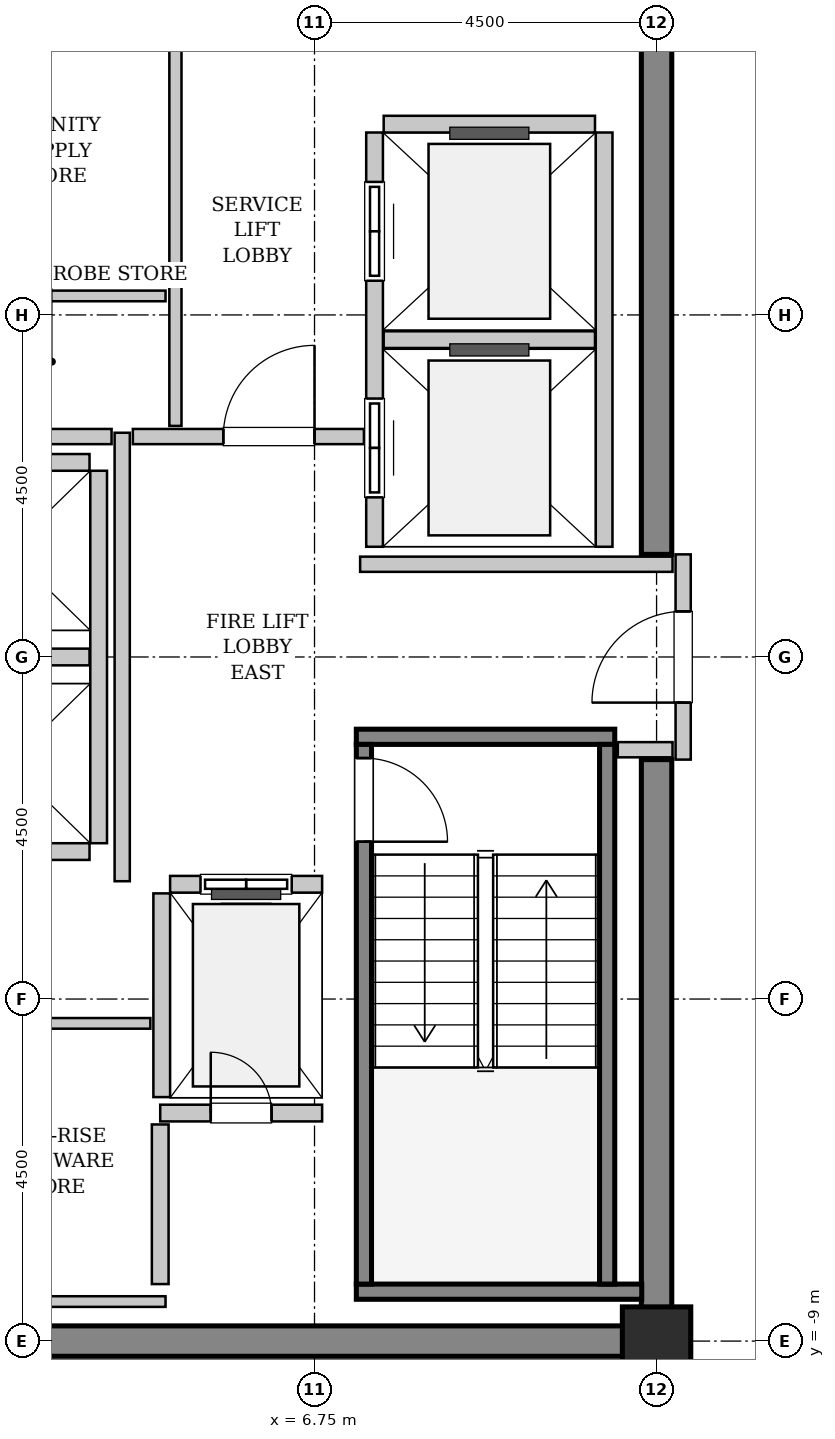
"""IFC4 building model, lengths in metres.
Left out: names, types, materials, properties, quantities, classifications, styles, units other than length and angle.
Written with IfcOpenShell. Run it as: python <this file> out.ifc"""

import sys

from ifc_helpers import new_model, si_unit, direction, frame, frame_2d, origin, origin_2d, place, context, subcontext, project, spatial, rectangle, extrude, source, transform, mapped, element, fill, save


model = new_model("IFC4")
c1 = context("Model", 3, precision=1e-05, world=origin(), true_north=direction((0.0, 1.0)))
c2 = subcontext(c1, "Body", "Model", "MODEL_VIEW")
j1 = project(units=[si_unit("LENGTHUNIT", "METRE"), si_unit("PLANEANGLEUNIT", "RADIAN")], contexts=[c1])
p1 = place(None, origin())
s1 = spatial("IfcSite", under=j1, at=p1, CompositionType="ELEMENT")
p2 = place(p1, origin())
s2 = spatial("IfcBuilding", under=s1, at=p2, CompositionType="ELEMENT")
p3 = place(p2, frame((0.0, 0.0, 345.2)))
s3 = spatial("IfcBuildingStorey", under=s2, at=p3, CompositionType="ELEMENT", Elevation=345.2)
m1 = source(origin(), c2, "Body", "SweptSolid", [
    extrude(rectangle(XDim=9.9, YDim=0.4, at=frame_2d((4.95, 0.0))), origin(), (0.0, 0.0, 1.0), 3.8),
])
p4 = place(p3, frame((1.55, -9.0, 0.0), z_axis=(0.0, 0.0, 1.0), x_axis=(1.0, 0.0, 0.0)))
e1 = element("IfcWall", 1, at=p4, inside=s3, PredefinedType="SHEAR", context=c2, shape_type="MappedRepresentation", body=[
    mapped(m1, transform((0.0, 0.0, 0.0), x_axis=(1.0, 0.0, 0.0), y_axis=(0.0, 1.0, 0.0), z_axis=(0.0, 0.0, 1.0), scale=1.0)),
])
m2 = source(origin(), c2, "Body", "SweptSolid", [
    extrude(rectangle(XDim=7.45, YDim=0.4, at=frame_2d((3.725, 0.0))), origin(), (0.0, 0.0, 1.0), 3.8),
])
for number, where, z_axis, x_axis in (
    (2, (11.25, -8.8, 0.0), (0.0, 0.0, 1.0), (0.0, 1.0, 0.0)),
    (3, (11.25, 1.35, 0.0), (0.0, 0.0, 1.0), (0.0, 1.0, 0.0)),
):
    element("IfcWall", number, at=place(p3, frame(where, z_axis=z_axis, x_axis=x_axis)), inside=s3, PredefinedType="SHEAR", context=c2, shape_type="MappedRepresentation", body=[
        mapped(m2, transform((0.0, 0.0, 0.0), x_axis=(1.0, 0.0, 0.0), y_axis=(0.0, 1.0, 0.0), z_axis=(0.0, 0.0, 1.0), scale=1.0)),
    ])
m3 = source(origin(), c2, "Body", "SweptSolid", [
    extrude(rectangle(XDim=0.9, YDim=0.9, at=origin_2d()), origin(), (0.0, 0.0, 1.0), 3.8),
])
p5 = place(p3, frame((11.25, -9.0, 0.0), z_axis=(0.0, 0.0, 1.0), x_axis=(1.0, 0.0, 0.0)))
e4 = element("IfcColumn", 4, at=p5, inside=s3, PredefinedType="COLUMN", context=c2, shape_type="MappedRepresentation", body=[
    mapped(m3, transform((0.0, 0.0, 0.0), x_axis=(1.0, 0.0, 0.0), y_axis=(0.0, 1.0, 0.0), z_axis=(0.0, 0.0, 1.0), scale=1.0)),
])
m4 = source(origin(), c2, "Body", "SweptSolid", [
    extrude(rectangle(XDim=3.4, YDim=0.2, at=frame_2d((1.7, 0.0))), origin(), (0.0, 0.0, 1.0), 3.8),
])
p6 = place(p3, frame((7.3, -1.05, 0.0), z_axis=(0.0, 0.0, 1.0), x_axis=(1.0, 0.0, 0.0)))
e5 = element("IfcWall", 5, at=p6, inside=s3, PredefinedType="SOLIDWALL", context=c2, shape_type="MappedRepresentation", body=[
    mapped(m4, transform((0.0, 0.0, 0.0), x_axis=(1.0, 0.0, 0.0), y_axis=(0.0, 1.0, 0.0), z_axis=(0.0, 0.0, 1.0), scale=1.0)),
])
m5 = source(origin(), c2, "Body", "SweptSolid", [
    extrude(rectangle(XDim=3.755, YDim=0.2, at=frame_2d((1.877, 0.0))), origin(), (0.0, 0.0, 1.0), 3.8),
])
p7 = place(p3, frame((7.3, -8.35, 0.0), z_axis=(0.0, 0.0, 1.0), x_axis=(1.0, 0.0, 0.0)))
e6 = element("IfcWall", 6, at=p7, inside=s3, PredefinedType="SOLIDWALL", context=c2, shape_type="MappedRepresentation", body=[
    mapped(m5, transform((0.0, 0.0, 0.0), x_axis=(1.0, 0.0, 0.0), y_axis=(0.0, 1.0, 0.0), z_axis=(0.0, 0.0, 1.0), scale=1.0)),
])
m6 = source(origin(), c2, "Body", "SweptSolid", [
    extrude(rectangle(XDim=7.1, YDim=0.2, at=frame_2d((3.55, 0.0))), origin(), (0.0, 0.0, 1.0), 3.8),
])
p8 = place(p3, frame((7.4, -1.15, 0.0), z_axis=(0.0, 0.0, 1.0), x_axis=(0.0, -1.0, 0.0)))
e7 = element("IfcWall", 7, at=p8, inside=s3, PredefinedType="SOLIDWALL", context=c2, shape_type="MappedRepresentation", body=[
    mapped(m6, transform((0.0, 0.0, 0.0), x_axis=(1.0, 0.0, 0.0), y_axis=(0.0, 1.0, 0.0), z_axis=(0.0, 0.0, 1.0), scale=1.0)),
])
p9 = place(p8, frame((0.18, 0.0, 0.0)))
e8 = element("IfcOpeningElement", 8, at=p9, cuts=e7, PredefinedType="OPENING", context=c2, shape_type="SweptSolid", body=[
    extrude(rectangle(XDim=1.1, YDim=2.15, at=frame_2d((0.55, 1.075))), frame((0.0, 0.11, 0.0), z_axis=(0.0, -1.0, 0.0), x_axis=(1.0, 0.0, 0.0)), (0.0, 0.0, 1.0), 0.22),
])
p10 = place(p3, frame((10.6, -1.15, 0.0), z_axis=(0.0, 0.0, 1.0), x_axis=(0.0, -1.0, 0.0)))
e9 = element("IfcWall", 9, at=p10, inside=s3, PredefinedType="SOLIDWALL", context=c2, shape_type="MappedRepresentation", body=[
    mapped(m6, transform((0.0, 0.0, 0.0), x_axis=(1.0, 0.0, 0.0), y_axis=(0.0, 1.0, 0.0), z_axis=(0.0, 0.0, 1.0), scale=1.0)),
])
m7 = source(origin(), c2, "Body", "SweptSolid", [
    extrude(rectangle(XDim=2.0, YDim=0.22, at=frame_2d((1.0, 0.0))), origin(), (0.0, 0.0, 1.0), 3.485),
])
p11 = place(p3, frame((6.85, -2.99, 0.0), z_axis=(0.0, 0.0, 1.0), x_axis=(-1.0, 0.0, 0.0)))
e10 = element("IfcWall", 10, at=p11, inside=s3, PredefinedType="SOLIDWALL", context=c2, shape_type="MappedRepresentation", body=[
    mapped(m7, transform((0.0, 0.0, 0.0), x_axis=(1.0, 0.0, 0.0), y_axis=(0.0, 1.0, 0.0), z_axis=(0.0, 0.0, 1.0), scale=1.0)),
])
p12 = place(p11, frame((0.4, 0.0, 0.0)))
e11 = element("IfcOpeningElement", 11, at=p12, cuts=e10, PredefinedType="OPENING", context=c2, shape_type="SweptSolid", body=[
    extrude(rectangle(XDim=1.2, YDim=2.2, at=frame_2d((0.6, 1.1))), frame((0.0, 0.12, 0.0), z_axis=(0.0, -1.0, 0.0), x_axis=(1.0, 0.0, 0.0)), (0.0, 0.0, 1.0), 0.24),
])
m8 = source(origin(), c2, "Body", "SweptSolid", [
    extrude(rectangle(XDim=2.68, YDim=0.22, at=frame_2d((1.34, 0.0))), origin(), (0.0, 0.0, 1.0), 3.485),
])
p13 = place(p3, frame((4.74, -3.11, 0.0), z_axis=(0.0, 0.0, 1.0), x_axis=(0.0, -1.0, 0.0)))
e12 = element("IfcWall", 12, at=p13, inside=s3, PredefinedType="SOLIDWALL", context=c2, shape_type="MappedRepresentation", body=[
    mapped(m8, transform((0.0, 0.0, 0.0), x_axis=(1.0, 0.0, 0.0), y_axis=(0.0, 1.0, 0.0), z_axis=(0.0, 0.0, 1.0), scale=1.0)),
])
m9 = source(origin(), c2, "Body", "SweptSolid", [
    extrude(rectangle(XDim=5.45, YDim=0.22, at=frame_2d((2.725, 0.0))), origin(), (0.0, 0.0, 1.0), 3.485),
])
p14 = place(p3, frame((7.54, 6.9, 0.0), z_axis=(0.0, 0.0, 1.0), x_axis=(0.0, -1.0, 0.0)))
e13 = element("IfcWall", 13, at=p14, inside=s3, PredefinedType="SOLIDWALL", context=c2, shape_type="MappedRepresentation", body=[
    mapped(m9, transform((0.0, 0.0, 0.0), x_axis=(1.0, 0.0, 0.0), y_axis=(0.0, 1.0, 0.0), z_axis=(0.0, 0.0, 1.0), scale=1.0)),
])
p15 = place(p14, frame((3.5, 0.0, 0.0)))
e14 = element("IfcOpeningElement", 14, at=p15, cuts=e13, PredefinedType="OPENING", context=c2, shape_type="SweptSolid", body=[
    extrude(rectangle(XDim=1.3, YDim=2.3, at=frame_2d((0.65, 1.15))), frame((0.0, 0.12, 0.0), z_axis=(0.0, -1.0, 0.0), x_axis=(1.0, 0.0, 0.0)), (0.0, 0.0, 1.0), 0.24),
])
p16 = place(p14, frame((0.65, 0.0, 0.0)))
e15 = element("IfcOpeningElement", 15, at=p16, cuts=e13, PredefinedType="OPENING", context=c2, shape_type="SweptSolid", body=[
    extrude(rectangle(XDim=1.3, YDim=2.3, at=frame_2d((0.65, 1.15))), frame((0.0, 0.12, 0.0), z_axis=(0.0, -1.0, 0.0), x_axis=(1.0, 0.0, 0.0)), (0.0, 0.0, 1.0), 0.24),
])
p17 = place(p3, frame((10.56, 1.45, 0.0), z_axis=(0.0, 0.0, 1.0), x_axis=(0.0, 1.0, 0.0)))
e16 = element("IfcWall", 16, at=p17, inside=s3, PredefinedType="SOLIDWALL", context=c2, shape_type="MappedRepresentation", body=[
    mapped(m9, transform((0.0, 0.0, 0.0), x_axis=(1.0, 0.0, 0.0), y_axis=(0.0, 1.0, 0.0), z_axis=(0.0, 0.0, 1.0), scale=1.0)),
])
m10 = source(origin(), c2, "Body", "SweptSolid", [
    extrude(rectangle(XDim=2.78, YDim=0.22, at=frame_2d((1.39, 0.0))), origin(), (0.0, 0.0, 1.0), 3.485),
])
for number, where, z_axis, x_axis in (
    (17, (7.66, 4.175, 0.0), (0.0, 0.0, 1.0), (1.0, 0.0, 0.0)),
    (18, (10.44, 7.01, 0.0), (0.0, 0.0, 1.0), (-1.0, 0.0, 0.0)),
):
    element("IfcWall", number, at=place(p3, frame(where, z_axis=z_axis, x_axis=x_axis)), inside=s3, PredefinedType="SOLIDWALL", context=c2, shape_type="MappedRepresentation", body=[
        mapped(m10, transform((0.0, 0.0, 0.0), x_axis=(1.0, 0.0, 0.0), y_axis=(0.0, 1.0, 0.0), z_axis=(0.0, 0.0, 1.0), scale=1.0)),
    ])
m11 = source(origin(), c2, "Body", "SweptSolid", [
    extrude(rectangle(XDim=4.9, YDim=0.22, at=frame_2d((2.45, 0.0))), origin(), (0.0, 0.0, 1.0), 3.485),
])
p18 = place(p3, frame((3.91, -2.45, 0.0), z_axis=(0.0, 0.0, 1.0), x_axis=(0.0, 1.0, 0.0)))
e19 = element("IfcWall", 19, at=p18, inside=s3, PredefinedType="SOLIDWALL", context=c2, shape_type="MappedRepresentation", body=[
    mapped(m11, transform((0.0, 0.0, 0.0), x_axis=(1.0, 0.0, 0.0), y_axis=(0.0, 1.0, 0.0), z_axis=(0.0, 0.0, 1.0), scale=1.0)),
])
m12 = source(origin(), c2, "Body", "SweptSolid", [
    extrude(rectangle(XDim=2.13, YDim=0.22, at=frame_2d((1.065, 0.0))), origin(), (0.0, 0.0, 1.0), 3.485),
])
for number, where, z_axis, x_axis in (
    (20, (1.66, -2.56, 0.0), (0.0, 0.0, 1.0), (1.0, 0.0, 0.0)),
    (21, (1.66, 0.0, 0.0), (0.0, 0.0, 1.0), (1.0, 0.0, 0.0)),
    (22, (3.79, 2.56, 0.0), (0.0, 0.0, 1.0), (-1.0, 0.0, 0.0)),
):
    element("IfcWall", number, at=place(p3, frame(where, z_axis=z_axis, x_axis=x_axis)), inside=s3, PredefinedType="SOLIDWALL", context=c2, shape_type="MappedRepresentation", body=[
        mapped(m12, transform((0.0, 0.0, 0.0), x_axis=(1.0, 0.0, 0.0), y_axis=(0.0, 1.0, 0.0), z_axis=(0.0, 0.0, 1.0), scale=1.0)),
    ])
p19 = place(p3, frame((4.72, -6.0, 0.0), z_axis=(0.0, 0.0, 1.0), x_axis=(1.0, 0.0, 0.0)))
e23 = element("IfcWall", 23, at=p19, inside=s3, PredefinedType="SOLIDWALL", context=c2, shape_type="MappedRepresentation", body=[
    mapped(m12, transform((0.0, 0.0, 0.0), x_axis=(1.0, 0.0, 0.0), y_axis=(0.0, 1.0, 0.0), z_axis=(0.0, 0.0, 1.0), scale=1.0)),
])
p20 = place(p19, frame((0.665, 0.0, 0.0)))
e24 = element("IfcOpeningElement", 24, at=p20, cuts=e23, PredefinedType="OPENING", context=c2, shape_type="SweptSolid", body=[
    extrude(rectangle(XDim=0.8, YDim=2.0, at=frame_2d((0.4, 1.0))), frame((0.0, 0.12, 0.0), z_axis=(0.0, -1.0, 0.0), x_axis=(1.0, 0.0, 0.0)), (0.0, 0.0, 1.0), 0.24),
])
m13 = source(origin(), c2, "Body", "SweptSolid", [
    extrude(rectangle(XDim=2.1, YDim=0.22, at=frame_2d((1.05, 0.0))), origin(), (0.0, 0.0, 1.0), 3.485),
])
p21 = place(p3, frame((4.72, -8.25, 0.0), z_axis=(0.0, 0.0, 1.0), x_axis=(0.0, 1.0, 0.0)))
e25 = element("IfcWall", 25, at=p21, inside=s3, PredefinedType="SOLIDWALL", context=c2, shape_type="MappedRepresentation", body=[
    mapped(m13, transform((0.0, 0.0, 0.0), x_axis=(1.0, 0.0, 0.0), y_axis=(0.0, 1.0, 0.0), z_axis=(0.0, 0.0, 1.0), scale=1.0)),
])
m14 = source(origin(), c2, "Body", "SweptSolid", [
    extrude(rectangle(XDim=2.7, YDim=0.2, at=frame_2d((1.35, 0.0))), origin(), (0.0, 0.0, 1.0), 2.575),
])
p22 = place(p3, frame((11.6, -1.35, 0.0), z_axis=(0.0, 0.0, 1.0), x_axis=(0.0, 1.0, 0.0)))
e26 = element("IfcWall", 26, at=p22, inside=s3, PredefinedType="PARTITIONING", context=c2, shape_type="MappedRepresentation", body=[
    mapped(m14, transform((0.0, 0.0, 0.0), x_axis=(1.0, 0.0, 0.0), y_axis=(0.0, 1.0, 0.0), z_axis=(0.0, 0.0, 1.0), scale=1.0)),
])
p23 = place(p22, frame((0.75, 0.0, 0.0)))
e27 = element("IfcOpeningElement", 27, at=p23, cuts=e26, PredefinedType="OPENING", context=c2, shape_type="SweptSolid", body=[
    extrude(rectangle(XDim=1.2, YDim=2.15, at=frame_2d((0.6, 1.075))), frame((0.0, 0.11, 0.0), z_axis=(0.0, -1.0, 0.0), x_axis=(1.0, 0.0, 0.0)), (0.0, 0.0, 1.0), 0.22),
])
m15 = source(origin(), c2, "Body", "SweptSolid", [
    extrude(rectangle(XDim=5.9, YDim=0.2, at=frame_2d((2.95, 0.0))), origin(), (0.0, 0.0, 1.0), 3.485),
])
p24 = place(p3, frame((4.22, -2.95, 0.0), z_axis=(0.0, 0.0, 1.0), x_axis=(0.0, 1.0, 0.0)))
e28 = element("IfcWall", 28, at=p24, inside=s3, PredefinedType="PARTITIONING", context=c2, shape_type="MappedRepresentation", body=[
    mapped(m15, transform((0.0, 0.0, 0.0), x_axis=(1.0, 0.0, 0.0), y_axis=(0.0, 1.0, 0.0), z_axis=(0.0, 0.0, 1.0), scale=1.0)),
])
m16 = source(origin(), c2, "Body", "SweptSolid", [
    extrude(rectangle(XDim=2.52, YDim=0.2, at=frame_2d((1.26, 0.0))), origin(), (0.0, 0.0, 1.0), 3.485),
])
p25 = place(p3, frame((1.56, 2.9, 0.0), z_axis=(0.0, 0.0, 1.0), x_axis=(1.0, 0.0, 0.0)))
e29 = element("IfcWall", 29, at=p25, inside=s3, PredefinedType="PARTITIONING", context=c2, shape_type="MappedRepresentation", body=[
    mapped(m16, transform((0.0, 0.0, 0.0), x_axis=(1.0, 0.0, 0.0), y_axis=(0.0, 1.0, 0.0), z_axis=(0.0, 0.0, 1.0), scale=1.0)),
])
m17 = source(origin(), c2, "Body", "SweptSolid", [
    extrude(rectangle(XDim=3.04, YDim=0.2, at=frame_2d((1.52, 0.0))), origin(), (0.0, 0.0, 1.0), 3.485),
])
p26 = place(p3, frame((4.36, 2.9, 0.0), z_axis=(0.0, 0.0, 1.0), x_axis=(1.0, 0.0, 0.0)))
e30 = element("IfcWall", 30, at=p26, inside=s3, PredefinedType="PARTITIONING", context=c2, shape_type="MappedRepresentation", body=[
    mapped(m17, transform((0.0, 0.0, 0.0), x_axis=(1.0, 0.0, 0.0), y_axis=(0.0, 1.0, 0.0), z_axis=(0.0, 0.0, 1.0), scale=1.0)),
])
p27 = place(p26, frame((1.19, 0.0, 0.0)))
e31 = element("IfcOpeningElement", 31, at=p27, cuts=e30, PredefinedType="OPENING", context=c2, shape_type="SweptSolid", body=[
    extrude(rectangle(XDim=1.2, YDim=2.15, at=frame_2d((0.6, 1.075))), frame((0.0, 0.11, 0.0), z_axis=(0.0, -1.0, 0.0), x_axis=(1.0, 0.0, 0.0)), (0.0, 0.0, 1.0), 0.22),
])
m18 = source(origin(), c2, "Body", "SweptSolid", [
    extrude(rectangle(XDim=4.11, YDim=0.2, at=frame_2d((2.055, 0.0))), origin(), (0.0, 0.0, 1.0), 3.485),
])
p28 = place(p3, frame((7.35, 1.22, 0.0), z_axis=(0.0, 0.0, 1.0), x_axis=(1.0, 0.0, 0.0)))
e32 = element("IfcWall", 32, at=p28, inside=s3, PredefinedType="PARTITIONING", context=c2, shape_type="MappedRepresentation", body=[
    mapped(m18, transform((0.0, 0.0, 0.0), x_axis=(1.0, 0.0, 0.0), y_axis=(0.0, 1.0, 0.0), z_axis=(0.0, 0.0, 1.0), scale=1.0)),
])
m19 = source(origin(), c2, "Body", "SweptSolid", [
    extrude(rectangle(XDim=0.72, YDim=0.2, at=frame_2d((0.36, 0.0))), origin(), (0.0, 0.0, 1.0), 3.485),
])
p29 = place(p3, frame((10.74, -1.22, 0.0), z_axis=(0.0, 0.0, 1.0), x_axis=(1.0, 0.0, 0.0)))
e33 = element("IfcWall", 33, at=p29, inside=s3, PredefinedType="PARTITIONING", context=c2, shape_type="MappedRepresentation", body=[
    mapped(m19, transform((0.0, 0.0, 0.0), x_axis=(1.0, 0.0, 0.0), y_axis=(0.0, 1.0, 0.0), z_axis=(0.0, 0.0, 1.0), scale=1.0)),
])
m20 = source(origin(), c2, "Body", "SweptSolid", [
    extrude(rectangle(XDim=5.45, YDim=0.16, at=frame_2d((2.725, 0.0))), origin(), (0.0, 0.0, 1.0), 3.485),
])
p30 = place(p3, frame((4.92, 3.04, 0.0), z_axis=(0.0, 0.0, 1.0), x_axis=(0.0, 1.0, 0.0)))
e34 = element("IfcWall", 34, at=p30, inside=s3, PredefinedType="PARTITIONING", context=c2, shape_type="MappedRepresentation", body=[
    mapped(m20, transform((0.0, 0.0, 0.0), x_axis=(1.0, 0.0, 0.0), y_axis=(0.0, 1.0, 0.0), z_axis=(0.0, 0.0, 1.0), scale=1.0)),
])
m21 = source(origin(), c2, "Body", "SweptSolid", [
    extrude(rectangle(XDim=3.15, YDim=0.14, at=frame_2d((1.575, 0.0))), origin(), (0.0, 0.0, 1.0), 3.485),
])
p31 = place(p3, frame((1.64, 4.75, 0.0), z_axis=(0.0, 0.0, 1.0), x_axis=(1.0, 0.0, 0.0)))
e35 = element("IfcWall", 35, at=p31, inside=s3, PredefinedType="PARTITIONING", context=c2, shape_type="MappedRepresentation", body=[
    mapped(m21, transform((0.0, 0.0, 0.0), x_axis=(1.0, 0.0, 0.0), y_axis=(0.0, 1.0, 0.0), z_axis=(0.0, 0.0, 1.0), scale=1.0)),
])
m22 = source(origin(), c2, "Body", "SweptSolid", [
    extrude(rectangle(XDim=2.95, YDim=0.14, at=frame_2d((1.475, 0.0))), origin(), (0.0, 0.0, 1.0), 3.485),
])
p32 = place(p3, frame((1.64, -4.82, 0.0), z_axis=(0.0, 0.0, 1.0), x_axis=(1.0, 0.0, 0.0)))
e36 = element("IfcWall", 36, at=p32, inside=s3, PredefinedType="PARTITIONING", context=c2, shape_type="MappedRepresentation", body=[
    mapped(m22, transform((0.0, 0.0, 0.0), x_axis=(1.0, 0.0, 0.0), y_axis=(0.0, 1.0, 0.0), z_axis=(0.0, 0.0, 1.0), scale=1.0)),
])
p33 = place(p3, frame((1.64, -8.48, 0.0), z_axis=(0.0, 0.0, 1.0), x_axis=(1.0, 0.0, 0.0)))
e37 = element("IfcWall", 37, at=p33, inside=s3, PredefinedType="PARTITIONING", context=c2, shape_type="MappedRepresentation", body=[
    mapped(m21, transform((0.0, 0.0, 0.0), x_axis=(1.0, 0.0, 0.0), y_axis=(0.0, 1.0, 0.0), z_axis=(0.0, 0.0, 1.0), scale=1.0)),
])
m23 = source(origin(), c2, "Body", "SweptSolid", [
    extrude(rectangle(XDim=1.1, YDim=2.15, at=frame_2d((0.55, 1.075))), frame((0.0, 0.025, 0.0), z_axis=(0.0, -1.0, 0.0), x_axis=(1.0, 0.0, 0.0)), (0.0, 0.0, 1.0), 0.05),
])
p34 = place(p9, origin())
e38 = element("IfcDoor", 38, at=p34, inside=s3, OperationType="SINGLE_SWING_RIGHT", PredefinedType="DOOR", context=c2, shape_type="MappedRepresentation", body=[
    mapped(m23, transform((0.0, 0.0, 0.0), x_axis=(1.0, 0.0, 0.0), y_axis=(0.0, 1.0, 0.0), z_axis=(0.0, 0.0, 1.0), scale=1.0)),
])
fill(e8, e38)
m24 = source(origin(), c2, "Body", "SweptSolid", [
    extrude(rectangle(XDim=1.2, YDim=2.2, at=frame_2d((0.6, 1.1))), frame((0.0, 0.025, 0.0), z_axis=(0.0, -1.0, 0.0), x_axis=(1.0, 0.0, 0.0)), (0.0, 0.0, 1.0), 0.05),
])
p35 = place(p12, origin())
e39 = element("IfcDoor", 39, at=p35, inside=s3, OperationType="SLIDING_TO_LEFT", PredefinedType="DOOR", context=c2, shape_type="MappedRepresentation", body=[
    mapped(m24, transform((0.0, 0.0, 0.0), x_axis=(1.0, 0.0, 0.0), y_axis=(0.0, 1.0, 0.0), z_axis=(0.0, 0.0, 1.0), scale=1.0)),
])
fill(e11, e39)
m25 = source(origin(), c2, "Body", "SweptSolid", [
    extrude(rectangle(XDim=1.3, YDim=2.3, at=frame_2d((0.65, 1.15))), frame((0.0, 0.025, 0.0), z_axis=(0.0, -1.0, 0.0), x_axis=(1.0, 0.0, 0.0)), (0.0, 0.0, 1.0), 0.05),
])
p36 = place(p15, origin())
e40 = element("IfcDoor", 40, at=p36, inside=s3, OperationType="SLIDING_TO_RIGHT", PredefinedType="DOOR", context=c2, shape_type="MappedRepresentation", body=[
    mapped(m25, transform((0.0, 0.0, 0.0), x_axis=(1.0, 0.0, 0.0), y_axis=(0.0, 1.0, 0.0), z_axis=(0.0, 0.0, 1.0), scale=1.0)),
])
fill(e14, e40)
p37 = place(p16, origin())
e41 = element("IfcDoor", 41, at=p37, inside=s3, OperationType="SLIDING_TO_RIGHT", PredefinedType="DOOR", context=c2, shape_type="MappedRepresentation", body=[
    mapped(m25, transform((0.0, 0.0, 0.0), x_axis=(1.0, 0.0, 0.0), y_axis=(0.0, 1.0, 0.0), z_axis=(0.0, 0.0, 1.0), scale=1.0)),
])
fill(e15, e41)
m26 = source(origin(), c2, "Body", "SweptSolid", [
    extrude(rectangle(XDim=0.8, YDim=2.0, at=frame_2d((0.4, 1.0))), frame((0.0, 0.025, 0.0), z_axis=(0.0, -1.0, 0.0), x_axis=(1.0, 0.0, 0.0)), (0.0, 0.0, 1.0), 0.05),
])
p38 = place(p20, origin())
e42 = element("IfcDoor", 42, at=p38, inside=s3, OperationType="SINGLE_SWING_LEFT", PredefinedType="TRAPDOOR", context=c2, shape_type="MappedRepresentation", body=[
    mapped(m26, transform((0.0, 0.0, 0.0), x_axis=(1.0, 0.0, 0.0), y_axis=(0.0, 1.0, 0.0), z_axis=(0.0, 0.0, 1.0), scale=1.0)),
])
fill(e24, e42)
m27 = source(origin(), c2, "Body", "SweptSolid", [
    extrude(rectangle(XDim=1.2, YDim=2.15, at=frame_2d((0.6, 1.075))), frame((0.0, 0.025, 0.0), z_axis=(0.0, -1.0, 0.0), x_axis=(1.0, 0.0, 0.0)), (0.0, 0.0, 1.0), 0.05),
])
p39 = place(p23, origin())
e43 = element("IfcDoor", 43, at=p39, inside=s3, OperationType="SINGLE_SWING_LEFT", PredefinedType="DOOR", context=c2, shape_type="MappedRepresentation", body=[
    mapped(m27, transform((0.0, 0.0, 0.0), x_axis=(1.0, 0.0, 0.0), y_axis=(0.0, 1.0, 0.0), z_axis=(0.0, 0.0, 1.0), scale=1.0)),
])
fill(e27, e43)
p40 = place(p27, origin())
e44 = element("IfcDoor", 44, at=p40, inside=s3, OperationType="SINGLE_SWING_RIGHT", PredefinedType="DOOR", context=c2, shape_type="MappedRepresentation", body=[
    mapped(m27, transform((0.0, 0.0, 0.0), x_axis=(1.0, 0.0, 0.0), y_axis=(0.0, 1.0, 0.0), z_axis=(0.0, 0.0, 1.0), scale=1.0)),
])
fill(e31, e44)
save(model, sys.argv[1])
